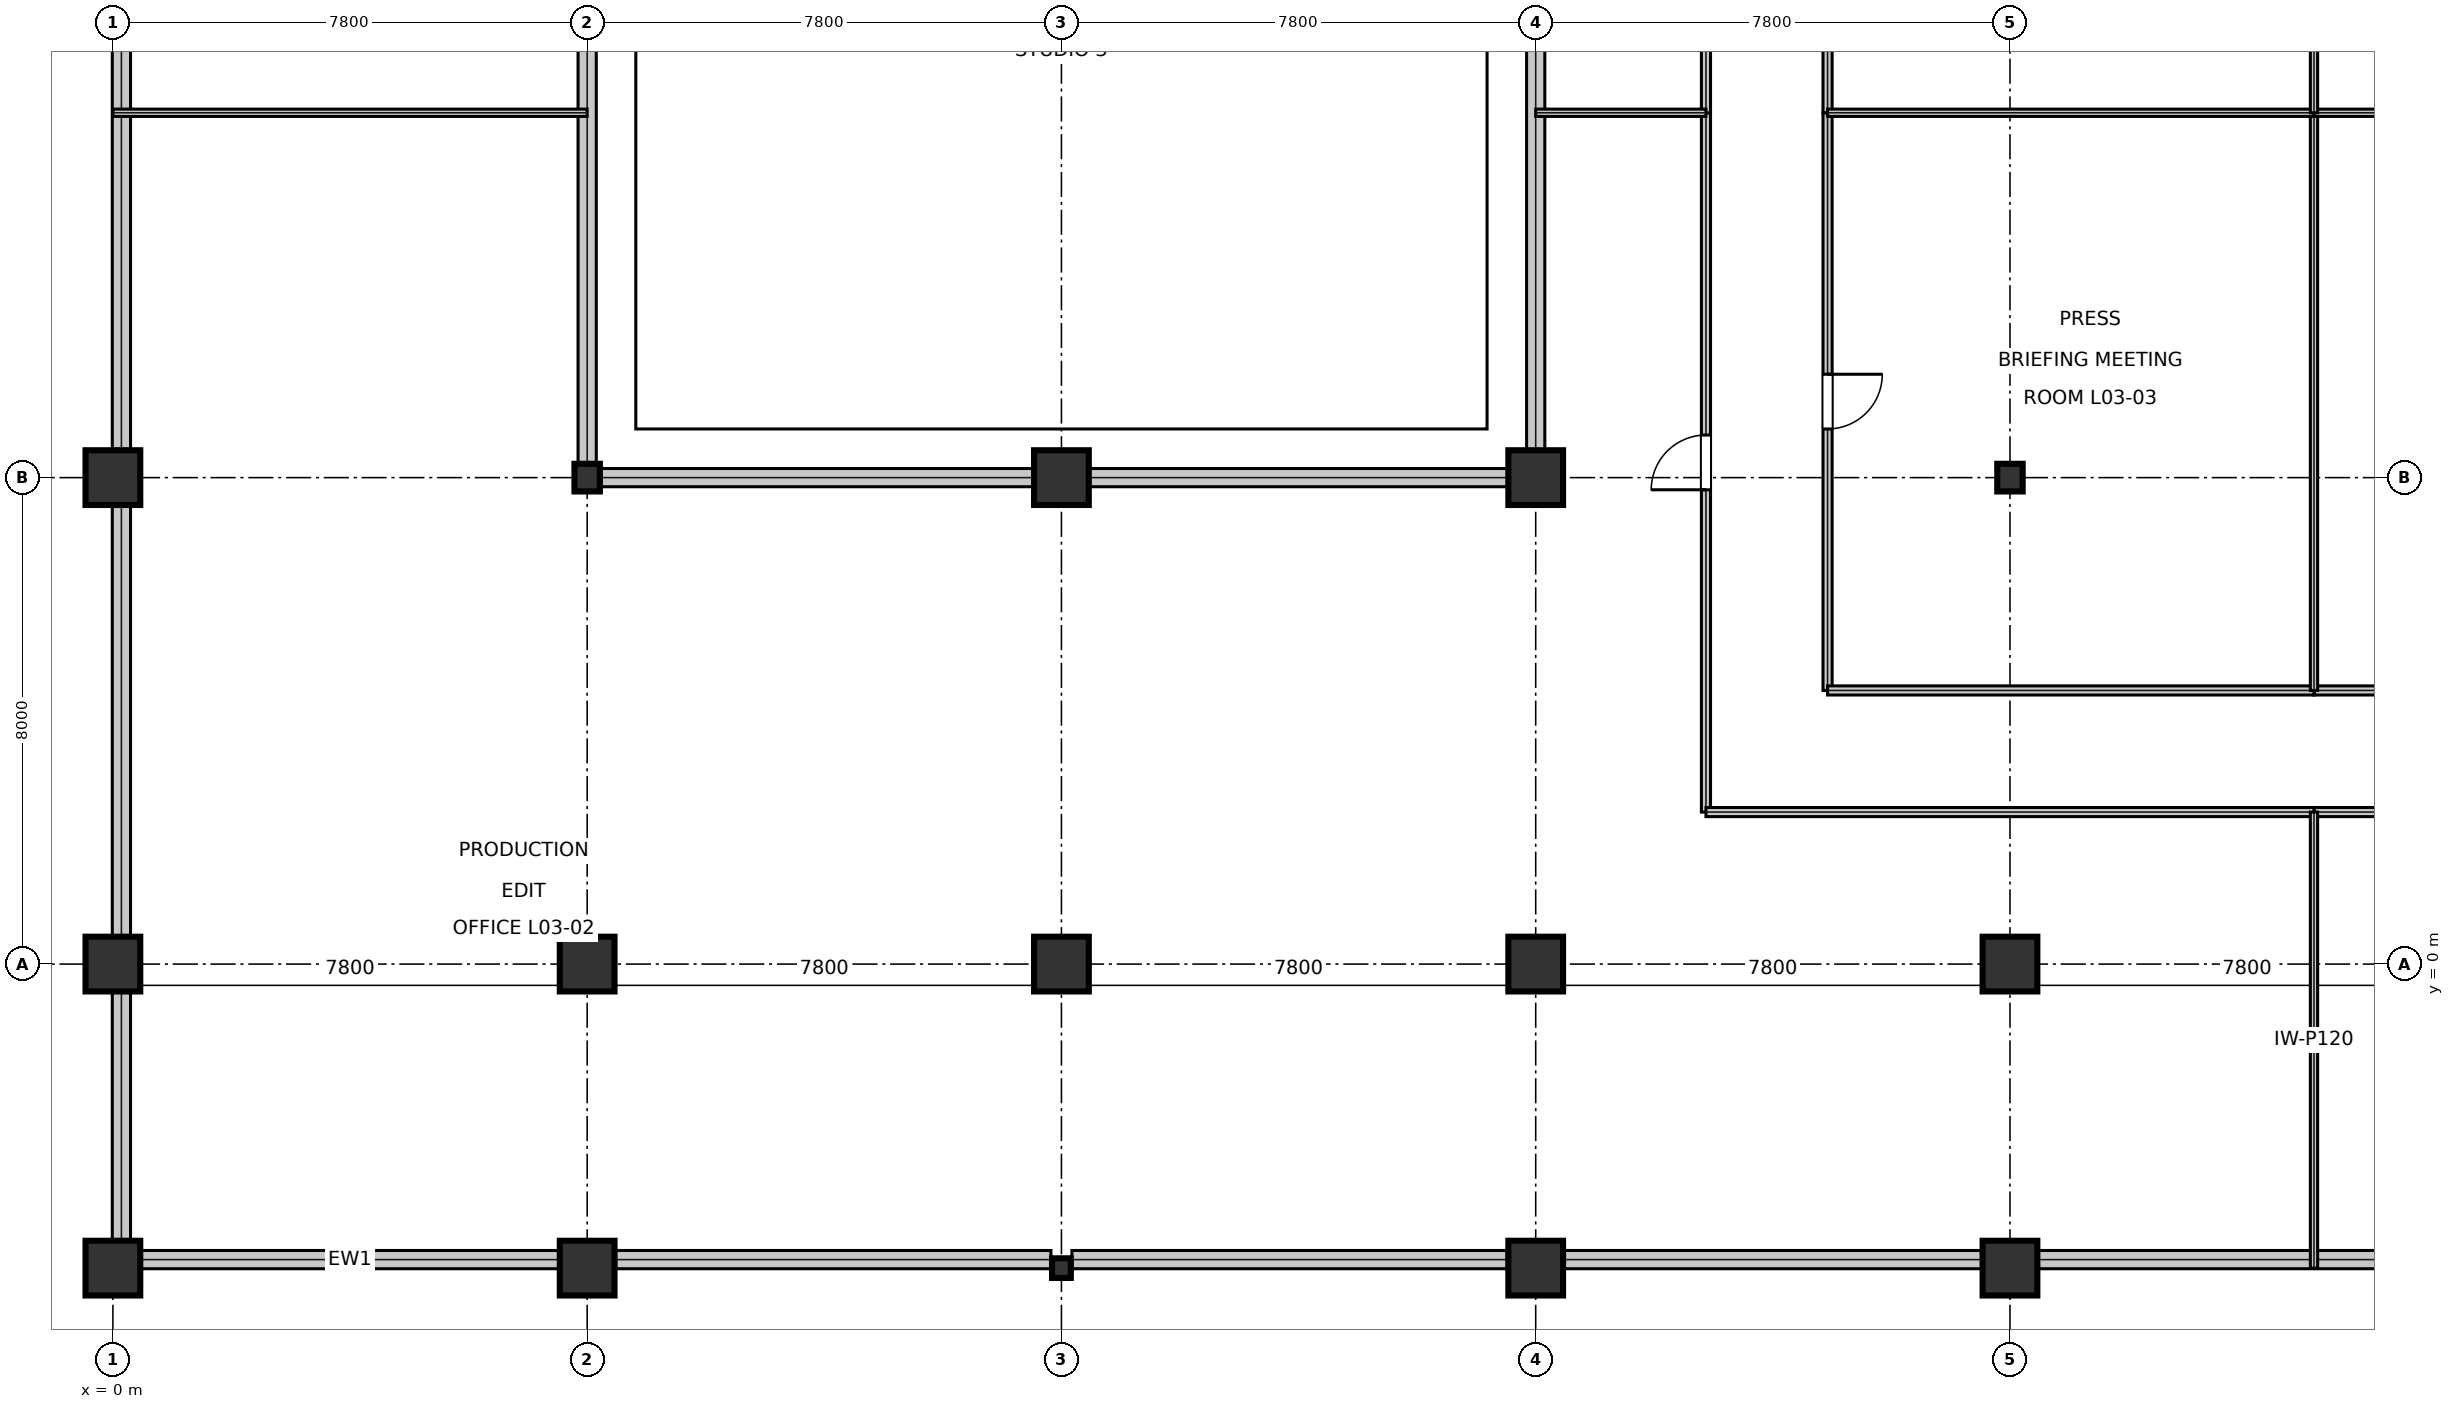
"""IFC4 building model, lengths in metres.
Left out: names, types, materials, properties, quantities, classifications, styles, units other than length and angle.
Written with IfcOpenShell. Run it as: python <this file> out.ifc"""

import sys

from ifc_helpers import new_model, si_unit, direction, frame, frame_2d, origin, origin_2d, place, context, subcontext, project, spatial, rectangle, i_section, extrude, element, fill, save


model = new_model("IFC4")
c1 = context("Model", 3, precision=1e-05, world=origin(), true_north=direction((0.0, 1.0)))
c2 = subcontext(c1, "Body", "Model", "MODEL_VIEW")
j1 = project(units=[si_unit("LENGTHUNIT", "METRE"), si_unit("PLANEANGLEUNIT", "RADIAN")], contexts=[c1])
p1 = place(None, origin())
s1 = spatial("IfcSite", under=j1, at=p1, CompositionType="ELEMENT")
p2 = place(p1, origin())
s2 = spatial("IfcBuilding", under=s1, at=p2, CompositionType="ELEMENT")
p3 = place(p2, frame((0.0, 0.0, 16.2)))
s3 = spatial("IfcBuildingStorey", under=s2, at=p3, CompositionType="ELEMENT", Elevation=16.2)
for number, where, z_axis, x_axis in (
    (1, (0.0, -5.0, 0.0), (0.0, 0.0, 1.0), (1.0, 0.0, 0.0)),
    (2, (0.0, 0.0, 0.0), (0.0, 0.0, 1.0), (1.0, 0.0, 0.0)),
    (3, (0.0, 8.0, 0.0), (0.0, 0.0, 1.0), (1.0, 0.0, 0.0)),
    (4, (7.8, -5.0, 0.0), (0.0, 0.0, 1.0), (1.0, 0.0, 0.0)),
    (5, (7.8, 0.0, 0.0), (0.0, 0.0, 1.0), (1.0, 0.0, 0.0)),
):
    element("IfcColumn", number, at=place(p3, frame(where, z_axis=z_axis, x_axis=x_axis)), inside=s3, PredefinedType="COLUMN", context=c2, shape_type="SweptSolid", body=[
        extrude(rectangle(XDim=0.9, YDim=0.9, at=origin_2d()), origin(), (0.0, 0.0, 1.0), 5.395),
    ])
p4 = place(p3, frame((7.8, 8.0, 0.0), z_axis=(0.0, 0.0, 1.0), x_axis=(1.0, 0.0, 0.0)))
e6 = element("IfcColumn", 6, at=p4, inside=s3, PredefinedType="COLUMN", context=c2, shape_type="SweptSolid", body=[
    extrude(i_section(OverallWidth=0.418, OverallDepth=0.455, WebThickness=0.042, FlangeThickness=0.068, at=origin_2d()), origin(), (0.0, 0.0, 1.0), 5.395),
])
p5 = place(p3, frame((15.6, -5.0, 0.0), z_axis=(0.0, 0.0, 1.0), x_axis=(1.0, 0.0, 0.0)))
e7 = element("IfcColumn", 7, at=p5, inside=s3, PredefinedType="COLUMN", context=c2, shape_type="SweptSolid", body=[
    extrude(i_section(OverallWidth=0.309, OverallDepth=0.323, WebThickness=0.013, FlangeThickness=0.023, at=origin_2d()), origin(), (0.0, 0.0, 1.0), 5.395),
])
for number, where, z_axis, x_axis in (
    (8, (15.6, 0.0, 0.0), (0.0, 0.0, 1.0), (1.0, 0.0, 0.0)),
    (9, (15.6, 8.0, 0.0), (0.0, 0.0, 1.0), (1.0, 0.0, 0.0)),
    (10, (23.4, -5.0, 0.0), (0.0, 0.0, 1.0), (1.0, 0.0, 0.0)),
    (11, (23.4, 0.0, 0.0), (0.0, 0.0, 1.0), (1.0, 0.0, 0.0)),
    (12, (23.4, 8.0, 0.0), (0.0, 0.0, 1.0), (1.0, 0.0, 0.0)),
    (13, (31.2, -5.0, 0.0), (0.0, 0.0, 1.0), (1.0, 0.0, 0.0)),
    (14, (31.2, 0.0, 0.0), (0.0, 0.0, 1.0), (1.0, 0.0, 0.0)),
):
    element("IfcColumn", number, at=place(p3, frame(where, z_axis=z_axis, x_axis=x_axis)), inside=s3, PredefinedType="COLUMN", context=c2, shape_type="SweptSolid", body=[
        extrude(rectangle(XDim=0.9, YDim=0.9, at=origin_2d()), origin(), (0.0, 0.0, 1.0), 5.395),
    ])
p6 = place(p3, frame((31.2, 8.0, 0.0), z_axis=(0.0, 0.0, 1.0), x_axis=(1.0, 0.0, 0.0)))
e15 = element("IfcColumn", 15, at=p6, inside=s3, PredefinedType="COLUMN", context=c2, shape_type="SweptSolid", body=[
    extrude(i_section(OverallWidth=0.418, OverallDepth=0.455, WebThickness=0.042, FlangeThickness=0.068, at=origin_2d()), origin(), (0.0, 0.0, 1.0), 5.395),
])
p7 = place(p3, frame((0.468, -4.86, 0.0), z_axis=(0.0, 0.0, 1.0), x_axis=(1.0, 0.0, 0.0)))
e16 = element("IfcWall", 16, at=p7, inside=s3, PredefinedType="STANDARD", context=c2, shape_type="SweptSolid", body=[
    extrude(rectangle(XDim=6.864, YDim=0.3, at=frame_2d((3.432, 0.0))), origin(), (0.0, 0.0, 1.0), 4.648),
])
for number, where, z_axis, x_axis in (
    (17, (8.268, -4.86, 0.0), (0.0, 0.0, 1.0), (1.0, 0.0, 0.0)),
    (18, (15.772, -4.86, 0.0), (0.0, 0.0, 1.0), (1.0, 0.0, 0.0)),
):
    element("IfcWall", number, at=place(p3, frame(where, z_axis=z_axis, x_axis=x_axis)), inside=s3, PredefinedType="STANDARD", context=c2, shape_type="SweptSolid", body=[
        extrude(rectangle(XDim=7.159, YDim=0.3, at=frame_2d((3.58, 0.0))), origin(), (0.0, 0.0, 1.0), 4.648),
    ])
for number, where, z_axis, x_axis in (
    (19, (23.868, -4.86, 0.0), (0.0, 0.0, 1.0), (1.0, 0.0, 0.0)),
    (20, (31.668, -4.86, 0.0), (0.0, 0.0, 1.0), (1.0, 0.0, 0.0)),
):
    element("IfcWall", number, at=place(p3, frame(where, z_axis=z_axis, x_axis=x_axis)), inside=s3, PredefinedType="STANDARD", context=c2, shape_type="SweptSolid", body=[
        extrude(rectangle(XDim=6.864, YDim=0.3, at=frame_2d((3.432, 0.0))), origin(), (0.0, 0.0, 1.0), 4.648),
    ])
for number, where, z_axis, x_axis in (
    (21, (0.14, 15.532, 0.0), (0.0, 0.0, 1.0), (0.0, -1.0, 0.0)),
    (22, (0.14, 7.532, 0.0), (0.0, 0.0, 1.0), (0.0, -1.0, 0.0)),
):
    element("IfcWall", number, at=place(p3, frame(where, z_axis=z_axis, x_axis=x_axis)), inside=s3, PredefinedType="STANDARD", context=c2, shape_type="SweptSolid", body=[
        extrude(rectangle(XDim=7.064, YDim=0.3, at=frame_2d((3.532, 0.0))), origin(), (0.0, 0.0, 1.0), 4.648),
    ])
p8 = place(p3, frame((0.14, -0.468, 0.0), z_axis=(0.0, 0.0, 1.0), x_axis=(0.0, -1.0, 0.0)))
e23 = element("IfcWall", 23, at=p8, inside=s3, PredefinedType="STANDARD", context=c2, shape_type="SweptSolid", body=[
    extrude(rectangle(XDim=4.064, YDim=0.3, at=frame_2d((2.032, 0.0))), origin(), (0.0, 0.0, 1.0), 4.648),
])
p9 = place(p3, frame((23.4, 8.0, 0.0), z_axis=(0.0, 0.0, 1.0), x_axis=(0.0, 1.0, 0.0)))
e24 = element("IfcWall", 24, at=p9, inside=s3, PredefinedType="PARTITIONING", context=c2, shape_type="SweptSolid", body=[
    extrude(rectangle(XDim=16.0, YDim=0.3, at=frame_2d((8.0, 0.0))), origin(), (0.0, 0.0, 1.0), 3.688),
])
p10 = place(p9, frame((11.5, 0.0, 0.0)))
e25 = element("IfcOpeningElement", 25, at=p10, cuts=e24, PredefinedType="OPENING", context=c2, shape_type="SweptSolid", body=[
    extrude(rectangle(XDim=1.8, YDim=2.4, at=frame_2d((0.9, 1.2))), frame((0.0, 0.16, 0.0), z_axis=(0.0, -1.0, 0.0), x_axis=(1.0, 0.0, 0.0)), (0.0, 0.0, 1.0), 0.32),
])
p11 = place(p3, frame((7.8, 8.0, 0.0), z_axis=(0.0, 0.0, 1.0), x_axis=(1.0, 0.0, 0.0)))
e26 = element("IfcWall", 26, at=p11, inside=s3, PredefinedType="PARTITIONING", context=c2, shape_type="SweptSolid", body=[
    extrude(rectangle(XDim=15.6, YDim=0.3, at=frame_2d((7.8, 0.0))), origin(), (0.0, 0.0, 1.0), 3.688),
])
p12 = place(p3, frame((7.8, 8.0, 0.0), z_axis=(0.0, 0.0, 1.0), x_axis=(0.0, 1.0, 0.0)))
e27 = element("IfcWall", 27, at=p12, inside=s3, PredefinedType="PARTITIONING", context=c2, shape_type="SweptSolid", body=[
    extrude(rectangle(XDim=16.0, YDim=0.3, at=frame_2d((8.0, 0.0))), origin(), (0.0, 0.0, 1.0), 3.688),
])
p13 = place(p3, frame((36.2, 2.5, 0.0), z_axis=(0.0, 0.0, 1.0), x_axis=(1.0, 0.0, 0.0)))
e28 = element("IfcWall", 28, at=p13, inside=s3, PredefinedType="PARTITIONING", context=c2, shape_type="SweptSolid", body=[
    extrude(rectangle(XDim=10.6, YDim=0.15, at=frame_2d((5.3, 0.0))), origin(), (0.0, 0.0, 1.0), 4.415),
])
p14 = place(p13, frame((4.85, 0.0, 0.0)))
e29 = element("IfcOpeningElement", 29, at=p14, cuts=e28, PredefinedType="OPENING", context=c2, shape_type="SweptSolid", body=[
    extrude(rectangle(XDim=0.9, YDim=2.15, at=frame_2d((0.45, 1.075))), frame((0.0, 0.085, 0.0), z_axis=(0.0, -1.0, 0.0), x_axis=(1.0, 0.0, 0.0)), (0.0, 0.0, 1.0), 0.17),
])
p15 = place(p3, frame((26.2, 2.5, 0.0), z_axis=(0.0, 0.0, 1.0), x_axis=(0.0, 1.0, 0.0)))
e30 = element("IfcWall", 30, at=p15, inside=s3, PredefinedType="PARTITIONING", context=c2, shape_type="SweptSolid", body=[
    extrude(rectangle(XDim=11.5, YDim=0.15, at=frame_2d((5.75, 0.0))), origin(), (0.0, 0.0, 1.0), 4.338),
])
p16 = place(p15, frame((5.3, 0.0, 0.0)))
e31 = element("IfcOpeningElement", 31, at=p16, cuts=e30, PredefinedType="OPENING", context=c2, shape_type="SweptSolid", body=[
    extrude(rectangle(XDim=0.9, YDim=2.15, at=frame_2d((0.45, 1.075))), frame((0.0, 0.085, 0.0), z_axis=(0.0, -1.0, 0.0), x_axis=(1.0, 0.0, 0.0)), (0.0, 0.0, 1.0), 0.17),
])
p17 = place(p3, frame((28.2, 4.5, 0.0), z_axis=(0.0, 0.0, 1.0), x_axis=(0.0, 1.0, 0.0)))
e32 = element("IfcWall", 32, at=p17, inside=s3, PredefinedType="PARTITIONING", context=c2, shape_type="SweptSolid", body=[
    extrude(rectangle(XDim=9.5, YDim=0.15, at=frame_2d((4.75, 0.0))), origin(), (0.0, 0.0, 1.0), 4.338),
])
p18 = place(p17, frame((4.3, 0.0, 0.0)))
e33 = element("IfcOpeningElement", 33, at=p18, cuts=e32, PredefinedType="OPENING", context=c2, shape_type="SweptSolid", body=[
    extrude(rectangle(XDim=0.9, YDim=2.15, at=frame_2d((0.45, 1.075))), frame((0.0, 0.085, 0.0), z_axis=(0.0, -1.0, 0.0), x_axis=(1.0, 0.0, 0.0)), (0.0, 0.0, 1.0), 0.17),
])
p19 = place(p3, frame((36.2, 4.5, 0.0), z_axis=(0.0, 0.0, 1.0), x_axis=(1.0, 0.0, 0.0)))
e34 = element("IfcWall", 34, at=p19, inside=s3, PredefinedType="PARTITIONING", context=c2, shape_type="SweptSolid", body=[
    extrude(rectangle(XDim=10.6, YDim=0.15, at=frame_2d((5.3, 0.0))), origin(), (0.0, 0.0, 1.0), 4.415),
])
p20 = place(p19, frame((4.85, 0.0, 0.0)))
e35 = element("IfcOpeningElement", 35, at=p20, cuts=e34, PredefinedType="OPENING", context=c2, shape_type="SweptSolid", body=[
    extrude(rectangle(XDim=0.9, YDim=2.15, at=frame_2d((0.45, 1.075))), frame((0.0, 0.085, 0.0), z_axis=(0.0, -1.0, 0.0), x_axis=(1.0, 0.0, 0.0)), (0.0, 0.0, 1.0), 0.17),
])
p21 = place(p3, frame((28.2, 14.0, 0.0), z_axis=(0.0, 0.0, 1.0), x_axis=(0.0, 1.0, 0.0)))
e36 = element("IfcWall", 36, at=p21, inside=s3, PredefinedType="PARTITIONING", context=c2, shape_type="SweptSolid", body=[
    extrude(rectangle(XDim=12.2, YDim=0.15, at=frame_2d((6.1, 0.0))), origin(), (0.0, 0.0, 1.0), 3.688),
])
p22 = place(p21, frame((5.65, 0.0, 0.0)))
e37 = element("IfcOpeningElement", 37, at=p22, cuts=e36, PredefinedType="OPENING", context=c2, shape_type="SweptSolid", body=[
    extrude(rectangle(XDim=0.9, YDim=2.15, at=frame_2d((0.45, 1.075))), frame((0.0, 0.085, 0.0), z_axis=(0.0, -1.0, 0.0), x_axis=(1.0, 0.0, 0.0)), (0.0, 0.0, 1.0), 0.17),
])
p23 = place(p3, frame((26.2, 14.0, 0.0), z_axis=(0.0, 0.0, 1.0), x_axis=(0.0, 1.0, 0.0)))
e38 = element("IfcWall", 38, at=p23, inside=s3, PredefinedType="PARTITIONING", context=c2, shape_type="SweptSolid", body=[
    extrude(rectangle(XDim=12.2, YDim=0.15, at=frame_2d((6.1, 0.0))), origin(), (0.0, 0.0, 1.0), 3.688),
])
p24 = place(p23, frame((5.65, 0.0, 0.0)))
e39 = element("IfcOpeningElement", 39, at=p24, cuts=e38, PredefinedType="OPENING", context=c2, shape_type="SweptSolid", body=[
    extrude(rectangle(XDim=0.9, YDim=2.15, at=frame_2d((0.45, 1.075))), frame((0.0, 0.085, 0.0), z_axis=(0.0, -1.0, 0.0), x_axis=(1.0, 0.0, 0.0)), (0.0, 0.0, 1.0), 0.17),
])
p25 = place(p3, frame((26.2, 2.5, 0.0), z_axis=(0.0, 0.0, 1.0), x_axis=(1.0, 0.0, 0.0)))
e40 = element("IfcWall", 40, at=p25, inside=s3, PredefinedType="PARTITIONING", context=c2, shape_type="SweptSolid", body=[
    extrude(rectangle(XDim=10.0, YDim=0.15, at=frame_2d((5.0, 0.0))), origin(), (0.0, 0.0, 1.0), 4.415),
])
p26 = place(p3, frame((28.2, 4.5, 0.0), z_axis=(0.0, 0.0, 1.0), x_axis=(1.0, 0.0, 0.0)))
e41 = element("IfcWall", 41, at=p26, inside=s3, PredefinedType="PARTITIONING", context=c2, shape_type="SweptSolid", body=[
    extrude(rectangle(XDim=8.0, YDim=0.15, at=frame_2d((4.0, 0.0))), origin(), (0.0, 0.0, 1.0), 4.415),
])
p27 = place(p3, frame((36.2, -5.0, 0.0), z_axis=(0.0, 0.0, 1.0), x_axis=(0.0, 1.0, 0.0)))
e42 = element("IfcWall", 42, at=p27, inside=s3, PredefinedType="PARTITIONING", context=c2, shape_type="SweptSolid", body=[
    extrude(rectangle(XDim=7.5, YDim=0.12, at=frame_2d((3.75, 0.0))), origin(), (0.0, 0.0, 1.0), 4.338),
])
p28 = place(p3, frame((23.4, 14.0, 0.0), z_axis=(0.0, 0.0, 1.0), x_axis=(1.0, 0.0, 0.0)))
e43 = element("IfcWall", 43, at=p28, inside=s3, PredefinedType="PARTITIONING", context=c2, shape_type="SweptSolid", body=[
    extrude(rectangle(XDim=2.8, YDim=0.12, at=frame_2d((1.4, 0.0))), origin(), (0.0, 0.0, 1.0), 5.12),
])
p29 = place(p3, frame((0.0, 14.0, 0.0), z_axis=(0.0, 0.0, 1.0), x_axis=(1.0, 0.0, 0.0)))
e44 = element("IfcWall", 44, at=p29, inside=s3, PredefinedType="PARTITIONING", context=c2, shape_type="SweptSolid", body=[
    extrude(rectangle(XDim=7.8, YDim=0.12, at=frame_2d((3.9, 0.0))), origin(), (0.0, 0.0, 1.0), 5.12),
])
p30 = place(p3, frame((36.2, 4.5, 0.0), z_axis=(0.0, 0.0, 1.0), x_axis=(0.0, 1.0, 0.0)))
e45 = element("IfcWall", 45, at=p30, inside=s3, PredefinedType="PARTITIONING", context=c2, shape_type="SweptSolid", body=[
    extrude(rectangle(XDim=9.5, YDim=0.12, at=frame_2d((4.75, 0.0))), origin(), (0.0, 0.0, 1.0), 4.338),
])
p31 = place(p3, frame((28.2, 14.0, 0.0), z_axis=(0.0, 0.0, 1.0), x_axis=(1.0, 0.0, 0.0)))
e46 = element("IfcWall", 46, at=p31, inside=s3, PredefinedType="PARTITIONING", context=c2, shape_type="SweptSolid", body=[
    extrude(rectangle(XDim=8.0, YDim=0.12, at=frame_2d((4.0, 0.0))), origin(), (0.0, 0.0, 1.0), 3.688),
])
p32 = place(p3, frame((36.2, 14.0, 0.0), z_axis=(0.0, 0.0, 1.0), x_axis=(1.0, 0.0, 0.0)))
e47 = element("IfcWall", 47, at=p32, inside=s3, PredefinedType="PARTITIONING", context=c2, shape_type="SweptSolid", body=[
    extrude(rectangle(XDim=10.6, YDim=0.12, at=frame_2d((5.3, 0.0))), origin(), (0.0, 0.0, 1.0), 4.415),
])
p33 = place(p3, frame((36.2, 14.0, 0.0), z_axis=(0.0, 0.0, 1.0), x_axis=(0.0, 1.0, 0.0)))
e48 = element("IfcWall", 48, at=p33, inside=s3, PredefinedType="PARTITIONING", context=c2, shape_type="SweptSolid", body=[
    extrude(rectangle(XDim=12.2, YDim=0.12, at=frame_2d((6.1, 0.0))), origin(), (0.0, 0.0, 1.0), 3.688),
])
p34 = place(p16, origin())
e49 = element("IfcDoor", 49, at=p34, inside=s3, OperationType="SINGLE_SWING_LEFT", PredefinedType="DOOR", context=c2, shape_type="SweptSolid", body=[
    extrude(rectangle(XDim=0.9, YDim=2.15, at=frame_2d((0.45, 1.075))), frame((0.0, 0.025, 0.0), z_axis=(0.0, -1.0, 0.0), x_axis=(1.0, 0.0, 0.0)), (0.0, 0.0, 1.0), 0.05),
])
fill(e31, e49)
p35 = place(p18, frame((0.9, 0.0, 0.0), z_axis=(0.0, 0.0, 1.0), x_axis=(-1.0, 0.0, 0.0)))
e50 = element("IfcDoor", 50, at=p35, inside=s3, OperationType="SINGLE_SWING_LEFT", PredefinedType="DOOR", context=c2, shape_type="SweptSolid", body=[
    extrude(rectangle(XDim=0.9, YDim=2.15, at=frame_2d((0.45, 1.075))), frame((0.0, 0.025, 0.0), z_axis=(0.0, -1.0, 0.0), x_axis=(1.0, 0.0, 0.0)), (0.0, 0.0, 1.0), 0.05),
])
fill(e33, e50)
save(model, sys.argv[1])
